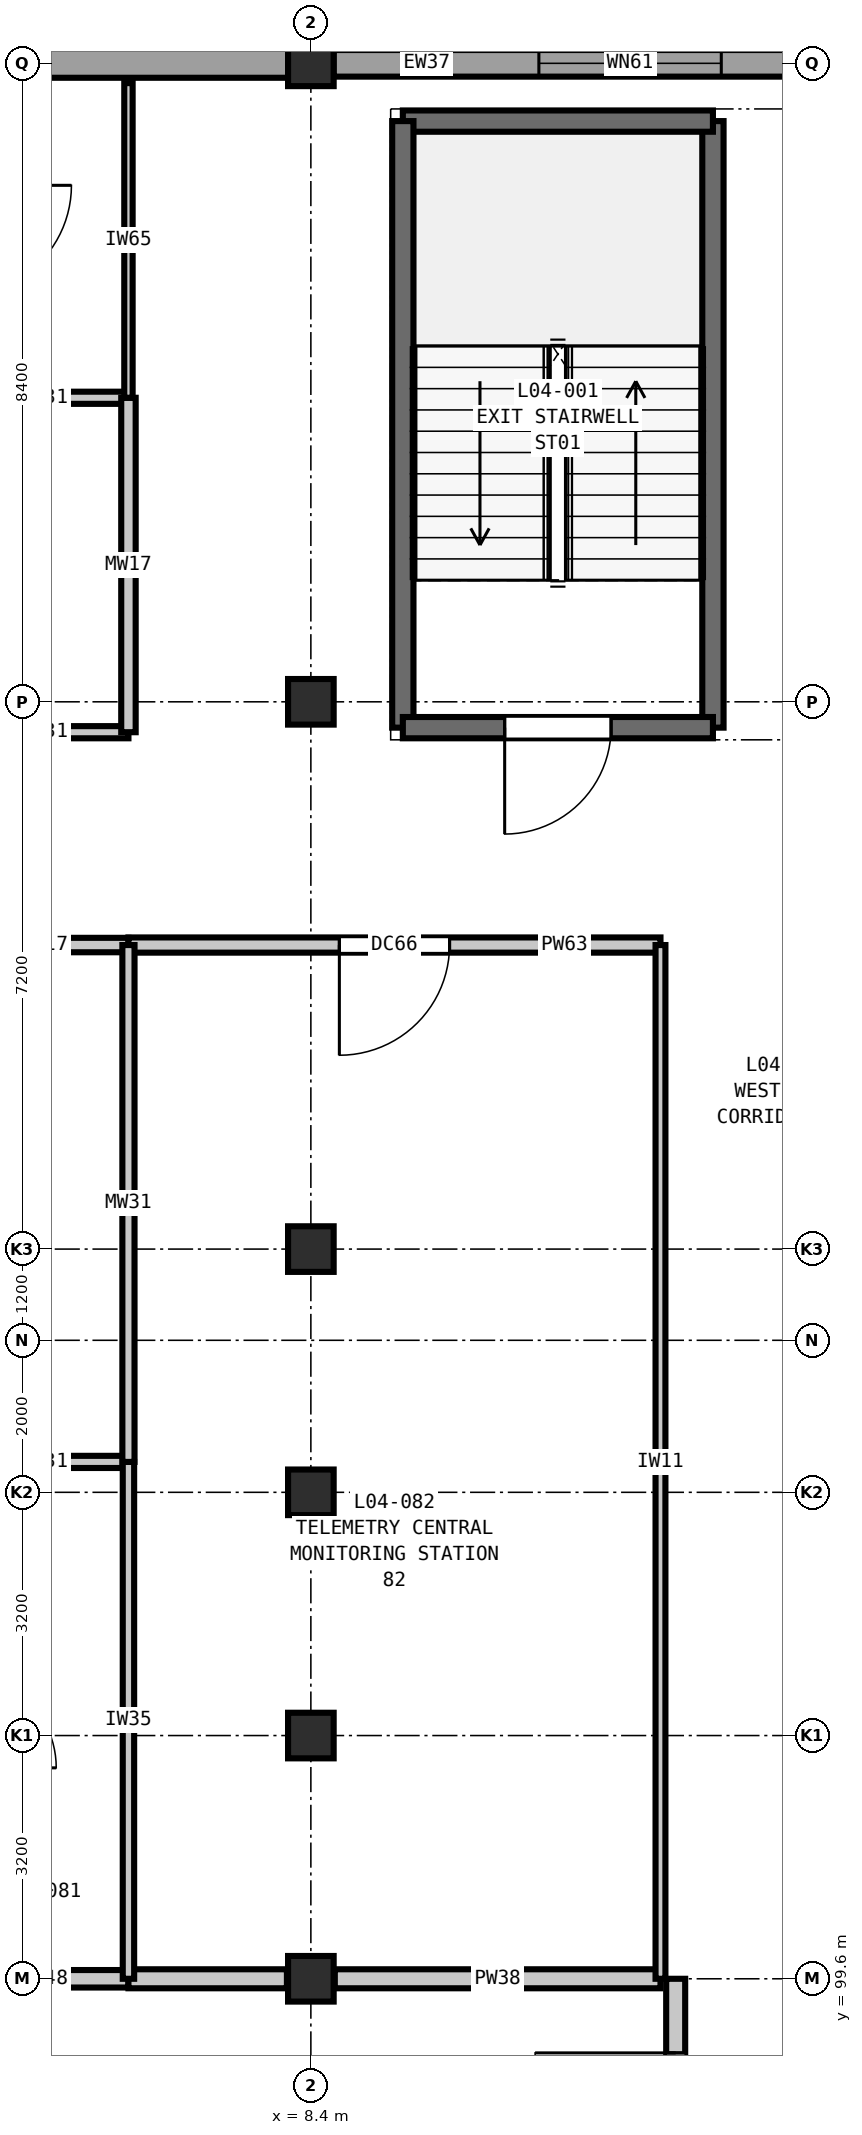
"""IFC4 building model, lengths in metres.
Left out: names, types, materials, properties, quantities, classifications, styles, units other than length and angle.
Written with IfcOpenShell. Run it as: python <this file> out.ifc"""

import sys

from ifc_helpers import new_model, si_unit, direction, frame, frame_2d, origin, origin_2d, place, context, subcontext, project, spatial, rectangle, extrude, element, fill, save


model = new_model("IFC4")
c1 = context("Model", 3, precision=1e-05, world=origin(), true_north=direction((0.0, 1.0)))
c2 = subcontext(c1, "Body", "Model", "MODEL_VIEW")
j1 = project(units=[si_unit("LENGTHUNIT", "METRE"), si_unit("PLANEANGLEUNIT", "RADIAN")], contexts=[c1])
p1 = place(None, origin())
s1 = spatial("IfcSite", under=j1, at=p1, CompositionType="ELEMENT")
p2 = place(p1, origin())
s2 = spatial("IfcBuilding", under=s1, at=p2, CompositionType="ELEMENT")
p3 = place(p2, frame((0.0, 0.0, 20.4)))
s3 = spatial("IfcBuildingStorey", under=s2, at=p3, CompositionType="ELEMENT", Elevation=20.4)
for number, where, z_axis, x_axis in (
    (1, (8.4, 99.6, 0.0), (0.0, 0.0, 1.0), (1.0, 0.0, 0.0)),
    (2, (8.4, 102.8, 0.0), (0.0, 0.0, 1.0), (1.0, 0.0, 0.0)),
    (3, (8.4, 106.0, 0.0), (0.0, 0.0, 1.0), (1.0, 0.0, 0.0)),
    (4, (8.4, 109.2, 0.0), (0.0, 0.0, 1.0), (1.0, 0.0, 0.0)),
    (5, (8.4, 116.4, 0.0), (0.0, 0.0, 1.0), (1.0, 0.0, 0.0)),
    (6, (8.4, 124.8, 0.0), (0.0, 0.0, 1.0), (1.0, 0.0, 0.0)),
):
    element("IfcColumn", number, at=place(p3, frame(where, z_axis=z_axis, x_axis=x_axis)), inside=s3, PredefinedType="COLUMN", context=c2, shape_type="SweptSolid", body=[
        extrude(rectangle(XDim=0.6, YDim=0.6, at=origin_2d()), origin(), (0.0, 0.0, 1.0), 4.2),
    ])
p4 = place(p3, frame((0.298, 124.8, 0.0), z_axis=(0.0, 0.0, 1.0), x_axis=(1.0, 0.0, 0.0)))
e7 = element("IfcWall", 7, at=p4, inside=s3, PredefinedType="SOLIDWALL", context=c2, shape_type="SweptSolid", body=[
    extrude(rectangle(XDim=7.804, YDim=0.38, at=frame_2d((3.902, 0.0))), origin(), (0.0, 0.0, 1.0), 3.48),
])
p5 = place(p3, frame((8.698, 124.8, 0.0), z_axis=(0.0, 0.0, 1.0), x_axis=(1.0, 0.0, 0.0)))
e8 = element("IfcWall", 8, at=p5, inside=s3, PredefinedType="SOLIDWALL", context=c2, shape_type="SweptSolid", body=[
    extrude(rectangle(XDim=7.804, YDim=0.35, at=frame_2d((3.902, 0.0))), origin(), (0.0, 0.0, 1.0), 3.48),
])
p6 = place(p5, frame((2.702, 0.0, 0.9)))
e9 = element("IfcOpeningElement", 9, at=p6, cuts=e8, PredefinedType="OPENING", context=c2, shape_type="SweptSolid", body=[
    extrude(rectangle(XDim=2.4, YDim=2.15, at=frame_2d((1.2, 1.075))), frame((0.0, 0.185, 0.0), z_axis=(0.0, -1.0, 0.0), x_axis=(1.0, 0.0, 0.0)), (0.0, 0.0, 1.0), 0.37),
])
p7 = place(p3, frame((13.69, 116.06, 0.0), z_axis=(0.0, 0.0, 1.0), x_axis=(0.0, 1.0, 0.0)))
e10 = element("IfcWall", 10, at=p7, inside=s3, PredefinedType="SHEAR", context=c2, shape_type="SweptSolid", body=[
    extrude(rectangle(XDim=7.98, YDim=0.28, at=frame_2d((3.99, 0.0))), origin(), (0.0, 0.0, 1.0), 4.2),
])
p8 = place(p3, frame((13.69, 124.04, 0.0), z_axis=(0.0, 0.0, 1.0), x_axis=(-1.0, 0.0, 0.0)))
e11 = element("IfcWall", 11, at=p8, inside=s3, PredefinedType="SHEAR", context=c2, shape_type="SweptSolid", body=[
    extrude(rectangle(XDim=4.08, YDim=0.28, at=frame_2d((2.04, 0.0))), origin(), (0.0, 0.0, 1.0), 4.2),
])
p9 = place(p3, frame((9.61, 124.04, 0.0), z_axis=(0.0, 0.0, 1.0), x_axis=(0.0, -1.0, 0.0)))
e12 = element("IfcWall", 12, at=p9, inside=s3, PredefinedType="SHEAR", context=c2, shape_type="SweptSolid", body=[
    extrude(rectangle(XDim=7.98, YDim=0.28, at=frame_2d((3.99, 0.0))), origin(), (0.0, 0.0, 1.0), 4.2),
])
p10 = place(p3, frame((9.61, 116.06, 0.0), z_axis=(0.0, 0.0, 1.0), x_axis=(1.0, 0.0, 0.0)))
e13 = element("IfcWall", 13, at=p10, inside=s3, PredefinedType="SHEAR", context=c2, shape_type="SweptSolid", body=[
    extrude(rectangle(XDim=4.08, YDim=0.28, at=frame_2d((2.04, 0.0))), origin(), (0.0, 0.0, 1.0), 4.2),
])
p11 = place(p10, frame((1.34, 0.0, 0.0)))
e14 = element("IfcOpeningElement", 14, at=p11, cuts=e13, PredefinedType="OPENING", context=c2, shape_type="SweptSolid", body=[
    extrude(rectangle(XDim=1.4, YDim=2.2, at=frame_2d((0.7, 1.1))), frame((0.0, 0.15, 0.0), z_axis=(0.0, -1.0, 0.0), x_axis=(1.0, 0.0, 0.0)), (0.0, 0.0, 1.0), 0.3),
])
p12 = place(p3, frame((3.8, 99.6, 0.0), z_axis=(0.0, 0.0, 1.0), x_axis=(1.0, 0.0, 0.0)))
e15 = element("IfcWall", 15, at=p12, inside=s3, PredefinedType="PARTITIONING", context=c2, shape_type="SweptSolid", body=[
    extrude(rectangle(XDim=2.2, YDim=0.23, at=frame_2d((1.1, 0.0))), origin(), (0.0, 0.0, 1.0), 3.585),
])
p13 = place(p3, frame((8.715, 99.6, 0.0), z_axis=(0.0, 0.0, 1.0), x_axis=(1.0, 0.0, 0.0)))
e16 = element("IfcWall", 16, at=p13, inside=s3, PredefinedType="PARTITIONING", context=c2, shape_type="SweptSolid", body=[
    extrude(rectangle(XDim=4.285, YDim=0.25, at=frame_2d((2.143, 0.0))), origin(), (0.0, 0.0, 1.0), 3.585),
])
p14 = place(p3, frame((6.0, 99.6, 0.0), z_axis=(0.0, 0.0, 1.0), x_axis=(1.0, 0.0, 0.0)))
e17 = element("IfcWall", 17, at=p14, inside=s3, PredefinedType="PARTITIONING", context=c2, shape_type="SweptSolid", body=[
    extrude(rectangle(XDim=2.085, YDim=0.25, at=frame_2d((1.042, 0.0))), origin(), (0.0, 0.0, 1.0), 3.585),
])
p15 = place(p3, frame((3.8, 106.4, 0.0), z_axis=(0.0, 0.0, 1.0), x_axis=(1.0, 0.0, 0.0)))
e18 = element("IfcWall", 18, at=p15, inside=s3, PredefinedType="PLUMBINGWALL", context=c2, shape_type="SweptSolid", body=[
    extrude(rectangle(XDim=2.2, YDim=0.16, at=frame_2d((1.1, 0.0))), origin(), (0.0, 0.0, 1.0), 3.82),
])
p16 = place(p3, frame((3.8, 113.2, 0.0), z_axis=(0.0, 0.0, 1.0), x_axis=(1.0, 0.0, 0.0)))
e19 = element("IfcWall", 19, at=p16, inside=s3, PredefinedType="PLUMBINGWALL", context=c2, shape_type="SweptSolid", body=[
    extrude(rectangle(XDim=2.2, YDim=0.19, at=frame_2d((1.1, 0.0))), origin(), (0.0, 0.0, 1.0), 3.82),
])
p17 = place(p3, frame((6.0, 113.2, 0.0), z_axis=(0.0, 0.0, 1.0), x_axis=(1.0, 0.0, 0.0)))
e20 = element("IfcWall", 20, at=p17, inside=s3, PredefinedType="PARTITIONING", context=c2, shape_type="SweptSolid", body=[
    extrude(rectangle(XDim=7.0, YDim=0.2, at=frame_2d((3.5, 0.0))), origin(), (0.0, 0.0, 1.0), 3.82),
])
p18 = place(p17, frame((2.775, 0.0, 0.0)))
e21 = element("IfcOpeningElement", 21, at=p18, cuts=e20, PredefinedType="OPENING", context=c2, shape_type="SweptSolid", body=[
    extrude(rectangle(XDim=1.45, YDim=2.25, at=frame_2d((0.725, 1.125))), frame((0.0, 0.11, 0.0), z_axis=(0.0, -1.0, 0.0), x_axis=(1.0, 0.0, 0.0)), (0.0, 0.0, 1.0), 0.22),
])
for number, where, z_axis, x_axis in (
    (22, (3.8, 116.0, 0.0), (0.0, 0.0, 1.0), (1.0, 0.0, 0.0)),
    (23, (3.8, 120.4, 0.0), (0.0, 0.0, 1.0), (1.0, 0.0, 0.0)),
):
    element("IfcWall", number, at=place(p3, frame(where, z_axis=z_axis, x_axis=x_axis)), inside=s3, PredefinedType="PLUMBINGWALL", context=c2, shape_type="SweptSolid", body=[
        extrude(rectangle(XDim=2.2, YDim=0.16, at=frame_2d((1.1, 0.0))), origin(), (0.0, 0.0, 1.0), 3.82),
    ])
p19 = place(p3, frame((6.0, 99.6, 0.0), z_axis=(0.0, 0.0, 1.0), x_axis=(0.0, 1.0, 0.0)))
e24 = element("IfcWall", 24, at=p19, inside=s3, PredefinedType="PARTITIONING", context=c2, shape_type="SweptSolid", body=[
    extrude(rectangle(XDim=6.8, YDim=0.15, at=frame_2d((3.4, 0.0))), origin(), (0.0, 0.0, 1.0), 3.82),
])
p20 = place(p3, frame((6.0, 106.4, 0.0), z_axis=(0.0, 0.0, 1.0), x_axis=(0.0, 1.0, 0.0)))
e25 = element("IfcWall", 25, at=p20, inside=s3, PredefinedType="PLUMBINGWALL", context=c2, shape_type="SweptSolid", body=[
    extrude(rectangle(XDim=6.8, YDim=0.16, at=frame_2d((3.4, 0.0))), origin(), (0.0, 0.0, 1.0), 3.82),
])
p21 = place(p3, frame((6.0, 116.0, 0.0), z_axis=(0.0, 0.0, 1.0), x_axis=(0.0, 1.0, 0.0)))
e26 = element("IfcWall", 26, at=p21, inside=s3, PredefinedType="PLUMBINGWALL", context=c2, shape_type="SweptSolid", body=[
    extrude(rectangle(XDim=4.4, YDim=0.19, at=frame_2d((2.2, 0.0))), origin(), (0.0, 0.0, 1.0), 3.82),
])
p22 = place(p3, frame((6.0, 120.4, 0.0), z_axis=(0.0, 0.0, 1.0), x_axis=(0.0, 1.0, 0.0)))
e27 = element("IfcWall", 27, at=p22, inside=s3, PredefinedType="PARTITIONING", context=c2, shape_type="SweptSolid", body=[
    extrude(rectangle(XDim=4.14, YDim=0.11, at=frame_2d((2.07, 0.0))), origin(), (0.0, 0.0, 1.0), 3.82),
])
p23 = place(p3, frame((13.0, 99.6, 0.0), z_axis=(0.0, 0.0, 1.0), x_axis=(0.0, 1.0, 0.0)))
e28 = element("IfcWall", 28, at=p23, inside=s3, PredefinedType="PARTITIONING", context=c2, shape_type="SweptSolid", body=[
    extrude(rectangle(XDim=13.6, YDim=0.13, at=frame_2d((6.8, 0.0))), origin(), (0.0, 0.0, 1.0), 3.82),
])
p24 = place(p3, frame((13.2, 95.8, 0.0), z_axis=(0.0, 0.0, 1.0), x_axis=(0.0, 1.0, 0.0)))
e29 = element("IfcWall", 29, at=p24, inside=s3, PredefinedType="PARTITIONING", context=c2, shape_type="SweptSolid", body=[
    extrude(rectangle(XDim=3.8, YDim=0.25, at=frame_2d((1.9, 0.0))), origin(), (0.0, 0.0, 1.0), 3.82),
])
p25 = place(p24, frame((0.975, 0.0, 0.0)))
e30 = element("IfcOpeningElement", 30, at=p25, cuts=e29, PredefinedType="OPENING", context=c2, shape_type="SweptSolid", body=[
    extrude(rectangle(XDim=1.85, YDim=2.3, at=frame_2d((0.925, 1.15))), frame((0.0, 0.135, 0.0), z_axis=(0.0, -1.0, 0.0), x_axis=(1.0, 0.0, 0.0)), (0.0, 0.0, 1.0), 0.27),
])
p26 = place(p6, origin())
e31 = element("IfcWindow", 31, at=p26, inside=s3, PartitioningType="DOUBLE_PANEL_VERTICAL", PredefinedType="WINDOW", context=c2, shape_type="SweptSolid", body=[
    extrude(rectangle(XDim=2.4, YDim=2.15, at=frame_2d((1.2, 1.075))), frame((0.0, 0.03, 0.0), z_axis=(0.0, -1.0, 0.0), x_axis=(1.0, 0.0, 0.0)), (0.0, 0.0, 1.0), 0.06),
])
fill(e9, e31)
p27 = place(p11, frame((1.4, 0.0, 0.0), z_axis=(0.0, 0.0, 1.0), x_axis=(-1.0, 0.0, 0.0)))
e32 = element("IfcDoor", 32, at=p27, inside=s3, OperationType="SINGLE_SWING_RIGHT", PredefinedType="DOOR", context=c2, shape_type="SweptSolid", body=[
    extrude(rectangle(XDim=1.4, YDim=2.2, at=frame_2d((0.7, 1.1))), frame((0.0, 0.025, 0.0), z_axis=(0.0, -1.0, 0.0), x_axis=(1.0, 0.0, 0.0)), (0.0, 0.0, 1.0), 0.05),
])
fill(e14, e32)
p28 = place(p18, frame((1.45, 0.0, 0.0), z_axis=(0.0, 0.0, 1.0), x_axis=(-1.0, 0.0, 0.0)))
e33 = element("IfcDoor", 33, at=p28, inside=s3, OperationType="SINGLE_SWING_RIGHT", PredefinedType="DOOR", context=c2, shape_type="SweptSolid", body=[
    extrude(rectangle(XDim=1.45, YDim=2.25, at=frame_2d((0.725, 1.125))), frame((0.0, 0.025, 0.0), z_axis=(0.0, -1.0, 0.0), x_axis=(1.0, 0.0, 0.0)), (0.0, 0.0, 1.0), 0.05),
])
fill(e21, e33)
p29 = place(p25, origin())
e34 = element("IfcDoor", 34, at=p29, inside=s3, OperationType="SINGLE_SWING_RIGHT", PredefinedType="DOOR", context=c2, shape_type="SweptSolid", body=[
    extrude(rectangle(XDim=1.85, YDim=2.3, at=frame_2d((0.925, 1.15))), frame((0.0, 0.025, 0.0), z_axis=(0.0, -1.0, 0.0), x_axis=(1.0, 0.0, 0.0)), (0.0, 0.0, 1.0), 0.05),
])
fill(e30, e34)
save(model, sys.argv[1])
